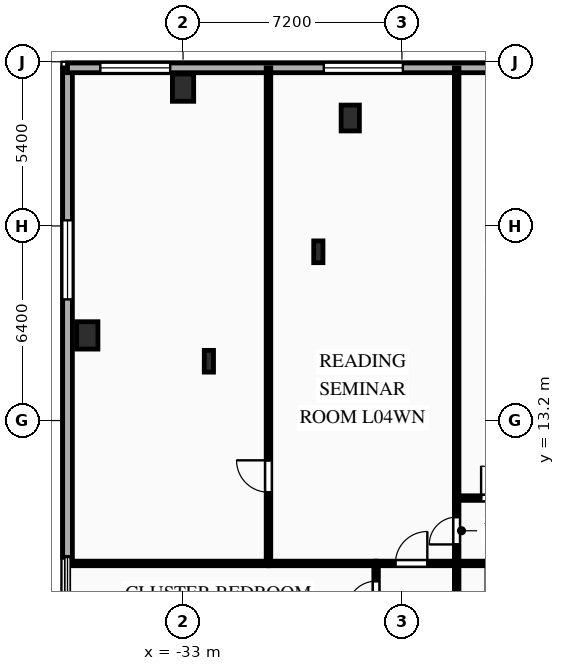
"""IFC4 building model, lengths in metres.
Left out: names, types, materials, properties, quantities, classifications, styles, units other than length and angle.
Written with IfcOpenShell. Run it as: python <this file> out.ifc"""

import sys

from ifc_helpers import new_model, si_unit, direction, frame, frame_2d, origin, origin_2d, place, context, subcontext, project, spatial, rectangle, i_section, extrude, element, fill, save


model = new_model("IFC4")
c1 = context("Model", 3, precision=1e-05, world=origin(), true_north=direction((0.0, 1.0)))
c2 = subcontext(c1, "Body", "Model", "MODEL_VIEW")
j1 = project(units=[si_unit("LENGTHUNIT", "METRE"), si_unit("PLANEANGLEUNIT", "RADIAN")], contexts=[c1])
p1 = place(None, origin())
s1 = spatial("IfcSite", under=j1, at=p1, CompositionType="ELEMENT")
p2 = place(p1, origin())
s2 = spatial("IfcBuilding", under=s1, at=p2, CompositionType="ELEMENT")
p3 = place(p2, frame((0.0, 0.0, 18.0)))
s3 = spatial("IfcBuildingStorey", under=s2, at=p3, CompositionType="ELEMENT", Elevation=18.0)
for number, where, z_axis, x_axis in (
    (1, (-33.0, 24.15, 0.0), (0.0, 0.0, 1.0), (1.0, 0.0, 0.0)),
    (2, (-36.15, 16.0, 0.0), (0.0, 0.0, 1.0), (1.0, 0.0, 0.0)),
):
    element("IfcColumn", number, at=place(p3, frame(where, z_axis=z_axis, x_axis=x_axis)), inside=s3, PredefinedType="COLUMN", context=c2, shape_type="SweptSolid", body=[
        extrude(rectangle(XDim=0.7, YDim=0.9, at=origin_2d()), origin(), (0.0, 0.0, 1.0), 4.5),
    ])
p4 = place(p3, frame((-27.5, 23.15, 0.0), z_axis=(0.0, 0.0, 1.0), x_axis=(1.0, 0.0, 0.0)))
e3 = element("IfcColumn", 3, at=p4, inside=s3, PredefinedType="PILASTER", context=c2, shape_type="SweptSolid", body=[
    extrude(rectangle(XDim=0.6, YDim=0.85, at=origin_2d()), origin(), (0.0, 0.0, 1.0), 4.5),
])
for number, where, z_axis, x_axis in (
    (4, (-28.55, 18.75, 0.0), (0.0, 0.0, 1.0), (1.0, 0.0, 0.0)),
    (5, (-32.15, 15.15, 0.0), (0.0, 0.0, 1.0), (1.0, 0.0, 0.0)),
):
    element("IfcColumn", number, at=place(p3, frame(where, z_axis=z_axis, x_axis=x_axis)), inside=s3, PredefinedType="COLUMN", context=c2, shape_type="SweptSolid", body=[
        extrude(i_section(OverallWidth=0.304, OverallDepth=0.716, WebThickness=0.021, FlangeThickness=0.04, FilletRadius=0.027, at=origin_2d()), origin(), (0.0, 0.0, 1.0), 4.5),
    ])
p5 = place(p3, frame((-36.8, 8.7, 0.0), z_axis=(0.0, 0.0, 1.0), x_axis=(0.0, 1.0, 0.0)))
e6 = element("IfcWall", 6, at=p5, inside=s3, PredefinedType="SOLIDWALL", context=c2, shape_type="SweptSolid", body=[
    extrude(rectangle(XDim=16.1, YDim=0.32, at=frame_2d((8.05, 0.0))), origin(), (0.0, 0.0, 1.0), 4.17),
])
p6 = place(p5, frame((8.485, 0.0, 0.85)))
e7 = element("IfcOpeningElement", 7, at=p6, cuts=e6, PredefinedType="OPENING", context=c2, shape_type="SweptSolid", body=[
    extrude(rectangle(XDim=2.6, YDim=2.4, at=frame_2d((1.3, 1.2))), frame((0.0, 0.17, 0.0), z_axis=(0.0, -1.0, 0.0), x_axis=(1.0, 0.0, 0.0)), (0.0, 0.0, 1.0), 0.34),
])
p7 = place(p3, frame((-36.8, 24.8, 0.0), z_axis=(0.0, 0.0, 1.0), x_axis=(1.0, 0.0, 0.0)))
e8 = element("IfcWall", 8, at=p7, inside=s3, PredefinedType="SOLIDWALL", context=c2, shape_type="SweptSolid", body=[
    extrude(rectangle(XDim=73.6, YDim=0.32, at=frame_2d((36.8, 0.0))), origin(), (0.0, 0.0, 1.0), 4.17),
])
p8 = place(p7, frame((1.079, 0.0, 0.85)))
e9 = element("IfcOpeningElement", 9, at=p8, cuts=e8, PredefinedType="OPENING", context=c2, shape_type="SweptSolid", body=[
    extrude(rectangle(XDim=2.3, YDim=2.4, at=frame_2d((1.15, 1.2))), frame((0.0, 0.17, 0.0), z_axis=(0.0, -1.0, 0.0), x_axis=(1.0, 0.0, 0.0)), (0.0, 0.0, 1.0), 0.34),
])
p9 = place(p7, frame((8.431, 0.0, 0.85)))
e10 = element("IfcOpeningElement", 10, at=p9, cuts=e8, PredefinedType="OPENING", context=c2, shape_type="SweptSolid", body=[
    extrude(rectangle(XDim=2.6, YDim=2.4, at=frame_2d((1.3, 1.2))), frame((0.0, 0.17, 0.0), z_axis=(0.0, -1.0, 0.0), x_axis=(1.0, 0.0, 0.0)), (0.0, 0.0, 1.0), 0.34),
])
p10 = place(p7, frame((15.168, 0.0, 0.85)))
e11 = element("IfcOpeningElement", 11, at=p10, cuts=e8, PredefinedType="OPENING", context=c2, shape_type="SweptSolid", body=[
    extrude(rectangle(XDim=1.1, YDim=1.85, at=frame_2d((0.55, 0.925))), frame((0.0, 0.17, 0.0), z_axis=(0.0, -1.0, 0.0), x_axis=(1.0, 0.0, 0.0)), (0.0, 0.0, 1.0), 0.34),
])
p11 = place(p7, frame((17.521, 0.0, 0.85)))
e12 = element("IfcOpeningElement", 12, at=p11, cuts=e8, PredefinedType="OPENING", context=c2, shape_type="SweptSolid", body=[
    extrude(rectangle(XDim=2.6, YDim=2.4, at=frame_2d((1.3, 1.2))), frame((0.0, 0.17, 0.0), z_axis=(0.0, -1.0, 0.0), x_axis=(1.0, 0.0, 0.0)), (0.0, 0.0, 1.0), 0.34),
])
p12 = place(p7, frame((26.246, 0.0, 0.85)))
e13 = element("IfcOpeningElement", 13, at=p12, cuts=e8, PredefinedType="OPENING", context=c2, shape_type="SweptSolid", body=[
    extrude(rectangle(XDim=2.0, YDim=2.4, at=frame_2d((1.0, 1.2))), frame((0.0, 0.17, 0.0), z_axis=(0.0, -1.0, 0.0), x_axis=(1.0, 0.0, 0.0)), (0.0, 0.0, 1.0), 0.34),
])
p13 = place(p7, frame((31.536, 0.0, 0.85)))
e14 = element("IfcOpeningElement", 14, at=p13, cuts=e8, PredefinedType="OPENING", context=c2, shape_type="SweptSolid", body=[
    extrude(rectangle(XDim=2.6, YDim=2.4, at=frame_2d((1.3, 1.2))), frame((0.0, 0.17, 0.0), z_axis=(0.0, -1.0, 0.0), x_axis=(1.0, 0.0, 0.0)), (0.0, 0.0, 1.0), 0.34),
])
p14 = place(p7, frame((39.544, 0.0, 0.85)))
e15 = element("IfcOpeningElement", 15, at=p14, cuts=e8, PredefinedType="OPENING", context=c2, shape_type="SweptSolid", body=[
    extrude(rectangle(XDim=2.6, YDim=2.4, at=frame_2d((1.3, 1.2))), frame((0.0, 0.17, 0.0), z_axis=(0.0, -1.0, 0.0), x_axis=(1.0, 0.0, 0.0)), (0.0, 0.0, 1.0), 0.34),
])
p15 = place(p7, frame((48.298, 0.0, 0.85)))
e16 = element("IfcOpeningElement", 16, at=p15, cuts=e8, PredefinedType="OPENING", context=c2, shape_type="SweptSolid", body=[
    extrude(rectangle(XDim=2.6, YDim=2.4, at=frame_2d((1.3, 1.2))), frame((0.0, 0.17, 0.0), z_axis=(0.0, -1.0, 0.0), x_axis=(1.0, 0.0, 0.0)), (0.0, 0.0, 1.0), 0.34),
])
p16 = place(p7, frame((53.56, 0.0, 0.85)))
e17 = element("IfcOpeningElement", 17, at=p16, cuts=e8, PredefinedType="OPENING", context=c2, shape_type="SweptSolid", body=[
    extrude(rectangle(XDim=2.6, YDim=2.4, at=frame_2d((1.3, 1.2))), frame((0.0, 0.17, 0.0), z_axis=(0.0, -1.0, 0.0), x_axis=(1.0, 0.0, 0.0)), (0.0, 0.0, 1.0), 0.34),
])
p17 = place(p7, frame((59.216, 0.0, 0.85)))
e18 = element("IfcOpeningElement", 18, at=p17, cuts=e8, PredefinedType="OPENING", context=c2, shape_type="SweptSolid", body=[
    extrude(rectangle(XDim=1.1, YDim=1.85, at=frame_2d((0.55, 0.925))), frame((0.0, 0.17, 0.0), z_axis=(0.0, -1.0, 0.0), x_axis=(1.0, 0.0, 0.0)), (0.0, 0.0, 1.0), 0.34),
])
p18 = place(p7, frame((62.649, 0.0, 0.85)))
e19 = element("IfcOpeningElement", 19, at=p18, cuts=e8, PredefinedType="OPENING", context=c2, shape_type="SweptSolid", body=[
    extrude(rectangle(XDim=2.6, YDim=2.4, at=frame_2d((1.3, 1.2))), frame((0.0, 0.17, 0.0), z_axis=(0.0, -1.0, 0.0), x_axis=(1.0, 0.0, 0.0)), (0.0, 0.0, 1.0), 0.34),
])
p19 = place(p7, frame((70.301, 0.0, 0.85)))
e20 = element("IfcOpeningElement", 20, at=p19, cuts=e8, PredefinedType="OPENING", context=c2, shape_type="SweptSolid", body=[
    extrude(rectangle(XDim=2.3, YDim=2.4, at=frame_2d((1.15, 1.2))), frame((0.0, 0.17, 0.0), z_axis=(0.0, -1.0, 0.0), x_axis=(1.0, 0.0, 0.0)), (0.0, 0.0, 1.0), 0.34),
])
p20 = place(p3, frame((-24.0, 8.5, 0.0), z_axis=(0.0, 0.0, 1.0), x_axis=(0.0, 1.0, 0.0)))
e21 = element("IfcWall", 21, at=p20, inside=s3, PredefinedType="PARTITIONING", context=c2, shape_type="SweptSolid", body=[
    extrude(rectangle(XDim=2.15, YDim=0.15, at=frame_2d((1.075, 0.0))), origin(), (0.0, 0.0, 1.0), 4.17),
])
p21 = place(p20, frame((0.625, 0.0, 0.0)))
e22 = element("IfcOpeningElement", 22, at=p21, cuts=e21, PredefinedType="OPENING", context=c2, shape_type="SweptSolid", body=[
    extrude(rectangle(XDim=0.9, YDim=2.1, at=frame_2d((0.45, 1.05))), frame((0.0, 0.085, 0.0), z_axis=(0.0, -1.0, 0.0), x_axis=(1.0, 0.0, 0.0)), (0.0, 0.0, 1.0), 0.17),
])
p22 = place(p3, frame((-18.8, 8.5, 0.0), z_axis=(0.0, 0.0, 1.0), x_axis=(-1.0, 0.0, 0.0)))
e23 = element("IfcWall", 23, at=p22, inside=s3, PredefinedType="PARTITIONING", context=c2, shape_type="SweptSolid", body=[
    extrude(rectangle(XDim=5.2, YDim=0.15, at=frame_2d((2.6, 0.0))), origin(), (0.0, 0.0, 1.0), 4.17),
])
p23 = place(p22, frame((3.196, 0.0, 0.0)))
e24 = element("IfcOpeningElement", 24, at=p23, cuts=e23, PredefinedType="OPENING", context=c2, shape_type="SweptSolid", body=[
    extrude(rectangle(XDim=1.05, YDim=2.15, at=frame_2d((0.525, 1.075))), frame((0.0, 0.085, 0.0), z_axis=(0.0, -1.0, 0.0), x_axis=(1.0, 0.0, 0.0)), (0.0, 0.0, 1.0), 0.17),
])
p24 = place(p3, frame((-24.0, 10.65, 0.0), z_axis=(0.0, 0.0, 1.0), x_axis=(1.0, 0.0, 0.0)))
e25 = element("IfcWall", 25, at=p24, inside=s3, PredefinedType="PARTITIONING", context=c2, shape_type="SweptSolid", body=[
    extrude(rectangle(XDim=4.0, YDim=0.15, at=frame_2d((2.0, 0.0))), origin(), (0.0, 0.0, 1.0), 4.17),
])
p25 = place(p24, frame((0.804, 0.0, 0.0)))
e26 = element("IfcOpeningElement", 26, at=p25, cuts=e25, PredefinedType="OPENING", context=c2, shape_type="SweptSolid", body=[
    extrude(rectangle(XDim=1.05, YDim=2.15, at=frame_2d((0.525, 1.075))), frame((0.0, 0.085, 0.0), z_axis=(0.0, -1.0, 0.0), x_axis=(1.0, 0.0, 0.0)), (0.0, 0.0, 1.0), 0.17),
])
p26 = place(p3, frame((-26.65, 8.5, 0.0), z_axis=(0.0, 0.0, 1.0), x_axis=(1.0, 0.0, 0.0)))
e27 = element("IfcWall", 27, at=p26, inside=s3, PredefinedType="PARTITIONING", context=c2, shape_type="SweptSolid", body=[
    extrude(rectangle(XDim=2.65, YDim=0.15, at=frame_2d((1.325, 0.0))), origin(), (0.0, 0.0, 1.0), 4.17),
])
p27 = place(p26, frame((0.635, 0.0, 0.0)))
e28 = element("IfcOpeningElement", 28, at=p27, cuts=e27, PredefinedType="OPENING", context=c2, shape_type="SweptSolid", body=[
    extrude(rectangle(XDim=1.05, YDim=2.15, at=frame_2d((0.525, 1.075))), frame((0.0, 0.085, 0.0), z_axis=(0.0, -1.0, 0.0), x_axis=(1.0, 0.0, 0.0)), (0.0, 0.0, 1.0), 0.17),
])
p28 = place(p3, frame((-26.65, 6.385, 0.0), z_axis=(0.0, 0.0, 1.0), x_axis=(0.0, 1.0, 0.0)))
e29 = element("IfcWall", 29, at=p28, inside=s3, PredefinedType="PARTITIONING", context=c2, shape_type="SweptSolid", body=[
    extrude(rectangle(XDim=2.115, YDim=0.15, at=frame_2d((1.058, 0.0))), origin(), (0.0, 0.0, 1.0), 4.17),
])
p29 = place(p28, frame((0.583, 0.0, 0.0)))
e30 = element("IfcOpeningElement", 30, at=p29, cuts=e29, PredefinedType="OPENING", context=c2, shape_type="SweptSolid", body=[
    extrude(rectangle(XDim=0.95, YDim=2.1, at=frame_2d((0.475, 1.05))), frame((0.0, 0.085, 0.0), z_axis=(0.0, -1.0, 0.0), x_axis=(1.0, 0.0, 0.0)), (0.0, 0.0, 1.0), 0.17),
])
p30 = place(p3, frame((-24.0, 8.5, 0.0), z_axis=(0.0, 0.0, 1.0), x_axis=(0.0, -1.0, 0.0)))
e31 = element("IfcWall", 31, at=p30, inside=s3, PredefinedType="PARTITIONING", context=c2, shape_type="SweptSolid", body=[
    extrude(rectangle(XDim=14.1, YDim=0.15, at=frame_2d((7.05, 0.0))), origin(), (0.0, 0.0, 1.0), 4.17),
])
p31 = place(p3, frame((-30.19, 8.5, 0.0), z_axis=(0.0, 0.0, 1.0), x_axis=(0.0, 1.0, 0.0)))
e32 = element("IfcWall", 32, at=p31, inside=s3, PredefinedType="PARTITIONING", context=c2, shape_type="SweptSolid", body=[
    extrude(rectangle(XDim=16.3, YDim=0.15, at=frame_2d((8.15, 0.0))), origin(), (0.0, 0.0, 1.0), 4.17),
])
p32 = place(p31, frame((2.341, 0.0, 0.0)))
e33 = element("IfcOpeningElement", 33, at=p32, cuts=e32, PredefinedType="OPENING", context=c2, shape_type="SweptSolid", body=[
    extrude(rectangle(XDim=1.05, YDim=2.15, at=frame_2d((0.525, 1.075))), frame((0.0, 0.085, 0.0), z_axis=(0.0, -1.0, 0.0), x_axis=(1.0, 0.0, 0.0)), (0.0, 0.0, 1.0), 0.17),
])
p33 = place(p3, frame((-26.65, 8.5, 0.0), z_axis=(0.0, 0.0, 1.0), x_axis=(-1.0, 0.0, 0.0)))
e34 = element("IfcWall", 34, at=p33, inside=s3, PredefinedType="PARTITIONING", context=c2, shape_type="SweptSolid", body=[
    extrude(rectangle(XDim=3.54, YDim=0.15, at=frame_2d((1.77, 0.0))), origin(), (0.0, 0.0, 1.0), 4.17),
])
p34 = place(p3, frame((-24.0, 24.8, 0.0), z_axis=(0.0, 0.0, 1.0), x_axis=(0.0, -1.0, 0.0)))
e35 = element("IfcWall", 35, at=p34, inside=s3, PredefinedType="PARTITIONING", context=c2, shape_type="SweptSolid", body=[
    extrude(rectangle(XDim=14.15, YDim=0.15, at=frame_2d((7.075, 0.0))), origin(), (0.0, 0.0, 1.0), 4.17),
])
p35 = place(p3, frame((-30.19, 8.5, 0.0), z_axis=(0.0, 0.0, 1.0), x_axis=(-1.0, 0.0, 0.0)))
e36 = element("IfcWall", 36, at=p35, inside=s3, PredefinedType="PARTITIONING", context=c2, shape_type="SweptSolid", body=[
    extrude(rectangle(XDim=6.61, YDim=0.15, at=frame_2d((3.305, 0.0))), origin(), (0.0, 0.0, 1.0), 4.17),
])
p36 = place(p6, origin())
e37 = element("IfcWindow", 37, at=p36, inside=s3, PartitioningType="SINGLE_PANEL", PredefinedType="WINDOW", context=c2, shape_type="SweptSolid", body=[
    extrude(rectangle(XDim=2.6, YDim=2.4, at=frame_2d((1.3, 1.2))), frame((0.0, 0.03, 0.0), z_axis=(0.0, -1.0, 0.0), x_axis=(1.0, 0.0, 0.0)), (0.0, 0.0, 1.0), 0.06),
])
fill(e7, e37)
p37 = place(p8, origin())
e38 = element("IfcWindow", 38, at=p37, inside=s3, PartitioningType="SINGLE_PANEL", PredefinedType="WINDOW", context=c2, shape_type="SweptSolid", body=[
    extrude(rectangle(XDim=2.3, YDim=2.4, at=frame_2d((1.15, 1.2))), frame((0.0, 0.03, 0.0), z_axis=(0.0, -1.0, 0.0), x_axis=(1.0, 0.0, 0.0)), (0.0, 0.0, 1.0), 0.06),
])
fill(e9, e38)
p38 = place(p9, origin())
e39 = element("IfcWindow", 39, at=p38, inside=s3, PartitioningType="SINGLE_PANEL", PredefinedType="WINDOW", context=c2, shape_type="SweptSolid", body=[
    extrude(rectangle(XDim=2.6, YDim=2.4, at=frame_2d((1.3, 1.2))), frame((0.0, 0.03, 0.0), z_axis=(0.0, -1.0, 0.0), x_axis=(1.0, 0.0, 0.0)), (0.0, 0.0, 1.0), 0.06),
])
fill(e10, e39)
p39 = place(p21, origin())
e40 = element("IfcDoor", 40, at=p39, inside=s3, OperationType="SINGLE_SWING_LEFT", PredefinedType="DOOR", context=c2, shape_type="SweptSolid", body=[
    extrude(rectangle(XDim=0.9, YDim=2.1, at=frame_2d((0.45, 1.05))), frame((0.0, 0.025, 0.0), z_axis=(0.0, -1.0, 0.0), x_axis=(1.0, 0.0, 0.0)), (0.0, 0.0, 1.0), 0.05),
])
fill(e22, e40)
p40 = place(p25, origin())
e41 = element("IfcDoor", 41, at=p40, inside=s3, OperationType="SINGLE_SWING_LEFT", PredefinedType="DOOR", context=c2, shape_type="SweptSolid", body=[
    extrude(rectangle(XDim=1.05, YDim=2.15, at=frame_2d((0.525, 1.075))), frame((0.0, 0.025, 0.0), z_axis=(0.0, -1.0, 0.0), x_axis=(1.0, 0.0, 0.0)), (0.0, 0.0, 1.0), 0.05),
])
fill(e26, e41)
p41 = place(p27, origin())
e42 = element("IfcDoor", 42, at=p41, inside=s3, OperationType="SINGLE_SWING_RIGHT", PredefinedType="DOOR", context=c2, shape_type="SweptSolid", body=[
    extrude(rectangle(XDim=1.05, YDim=2.15, at=frame_2d((0.525, 1.075))), frame((0.0, 0.025, 0.0), z_axis=(0.0, -1.0, 0.0), x_axis=(1.0, 0.0, 0.0)), (0.0, 0.0, 1.0), 0.05),
])
fill(e28, e42)
p42 = place(p29, origin())
e43 = element("IfcDoor", 43, at=p42, inside=s3, OperationType="SINGLE_SWING_LEFT", PredefinedType="DOOR", context=c2, shape_type="SweptSolid", body=[
    extrude(rectangle(XDim=0.95, YDim=2.1, at=frame_2d((0.475, 1.05))), frame((0.0, 0.025, 0.0), z_axis=(0.0, -1.0, 0.0), x_axis=(1.0, 0.0, 0.0)), (0.0, 0.0, 1.0), 0.05),
])
fill(e30, e43)
p43 = place(p32, origin())
e44 = element("IfcDoor", 44, at=p43, inside=s3, OperationType="SINGLE_SWING_RIGHT", PredefinedType="DOOR", context=c2, shape_type="SweptSolid", body=[
    extrude(rectangle(XDim=1.05, YDim=2.15, at=frame_2d((0.525, 1.075))), frame((0.0, 0.025, 0.0), z_axis=(0.0, -1.0, 0.0), x_axis=(1.0, 0.0, 0.0)), (0.0, 0.0, 1.0), 0.05),
])
fill(e33, e44)
save(model, sys.argv[1])
